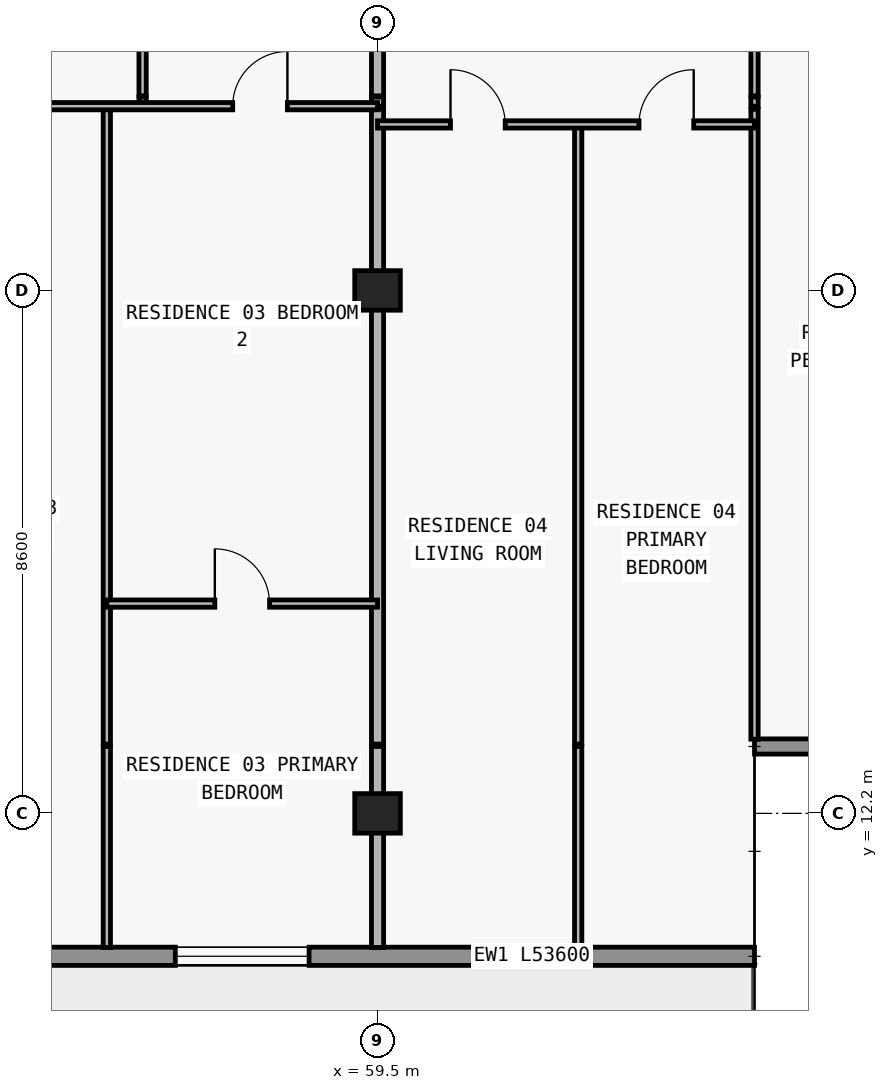
"""IFC4 building model, lengths in metres.
Left out: names, types, materials, properties, quantities, classifications, styles, units other than length and angle.
Written with IfcOpenShell. Run it as: python <this file> out.ifc"""

import sys

from ifc_helpers import new_model, si_unit, direction, frame, frame_2d, origin, origin_2d, place, context, subcontext, project, spatial, rectangle, extrude, element, fill, save


model = new_model("IFC4")
c1 = context("Model", 3, precision=1e-05, world=origin(), true_north=direction((0.0, 1.0)))
c2 = subcontext(c1, "Body", "Model", "MODEL_VIEW")
j1 = project(units=[si_unit("LENGTHUNIT", "METRE"), si_unit("PLANEANGLEUNIT", "RADIAN")], contexts=[c1])
p1 = place(None, origin())
s1 = spatial("IfcSite", under=j1, at=p1, CompositionType="ELEMENT")
p2 = place(p1, origin())
s2 = spatial("IfcBuilding", under=s1, at=p2, CompositionType="ELEMENT")
p3 = place(p2, frame((0.0, 0.0, 259.5)))
s3 = spatial("IfcBuildingStorey", under=s2, at=p3, CompositionType="ELEMENT", Elevation=259.5)
for number, where, z_axis, x_axis in (
    (1, (59.5, 12.2, 0.0), (0.0, 0.0, 1.0), (1.0, 0.0, 0.0)),
    (2, (59.5, 20.8, 0.0), (0.0, 0.0, 1.0), (1.0, 0.0, 0.0)),
):
    element("IfcColumn", number, at=place(p3, frame(where, z_axis=z_axis, x_axis=x_axis)), inside=s3, PredefinedType="COLUMN", context=c2, shape_type="SweptSolid", body=[
        extrude(rectangle(XDim=0.75, YDim=0.65, at=origin_2d()), origin(), (0.0, 0.0, 1.0), 3.05),
    ])
p4 = place(p3, frame((65.7, 9.85, 0.0), z_axis=(0.0, 0.0, 1.0), x_axis=(-1.0, 0.0, 0.0)))
e3 = element("IfcWall", 3, at=p4, inside=s3, PredefinedType="STANDARD", context=c2, shape_type="SweptSolid", body=[
    extrude(rectangle(XDim=53.6, YDim=0.3, at=frame_2d((26.8, 0.0))), origin(), (0.0, 0.0, 1.0), 3.05),
])
p5 = place(p4, frame((49.5, 0.0, 0.0)))
e4 = element("IfcOpeningElement", 4, at=p5, cuts=e3, PredefinedType="OPENING", context=c2, shape_type="SweptSolid", body=[
    extrude(rectangle(XDim=2.0, YDim=2.3, at=frame_2d((1.0, 1.15))), frame((0.0, 0.16, 0.0), z_axis=(0.0, -1.0, 0.0), x_axis=(1.0, 0.0, 0.0)), (0.0, 0.0, 1.0), 0.32),
])
p6 = place(p4, frame((42.1, 0.0, 0.85)))
e5 = element("IfcOpeningElement", 5, at=p6, cuts=e3, PredefinedType="OPENING", context=c2, shape_type="SweptSolid", body=[
    extrude(rectangle(XDim=2.2, YDim=1.55, at=frame_2d((1.1, 0.775))), frame((0.0, 0.16, 0.0), z_axis=(0.0, -1.0, 0.0), x_axis=(1.0, 0.0, 0.0)), (0.0, 0.0, 1.0), 0.32),
])
p7 = place(p4, frame((36.09, 0.0, 0.0)))
e6 = element("IfcOpeningElement", 6, at=p7, cuts=e3, PredefinedType="OPENING", context=c2, shape_type="SweptSolid", body=[
    extrude(rectangle(XDim=2.0, YDim=2.3, at=frame_2d((1.0, 1.15))), frame((0.0, 0.16, 0.0), z_axis=(0.0, -1.0, 0.0), x_axis=(1.0, 0.0, 0.0)), (0.0, 0.0, 1.0), 0.32),
])
p8 = place(p4, frame((31.41, 0.0, 0.65)))
e7 = element("IfcOpeningElement", 7, at=p8, cuts=e3, PredefinedType="OPENING", context=c2, shape_type="SweptSolid", body=[
    extrude(rectangle(XDim=2.6, YDim=1.85, at=frame_2d((1.3, 0.925))), frame((0.0, 0.16, 0.0), z_axis=(0.0, -1.0, 0.0), x_axis=(1.0, 0.0, 0.0)), (0.0, 0.0, 1.0), 0.32),
])
p9 = place(p4, frame((25.7, 0.0, 0.85)))
e8 = element("IfcOpeningElement", 8, at=p9, cuts=e3, PredefinedType="OPENING", context=c2, shape_type="SweptSolid", body=[
    extrude(rectangle(XDim=2.2, YDim=1.55, at=frame_2d((1.1, 0.775))), frame((0.0, 0.16, 0.0), z_axis=(0.0, -1.0, 0.0), x_axis=(1.0, 0.0, 0.0)), (0.0, 0.0, 1.0), 0.32),
])
p10 = place(p4, frame((17.7, 0.0, 0.85)))
e9 = element("IfcOpeningElement", 9, at=p10, cuts=e3, PredefinedType="OPENING", context=c2, shape_type="SweptSolid", body=[
    extrude(rectangle(XDim=2.2, YDim=1.55, at=frame_2d((1.1, 0.775))), frame((0.0, 0.16, 0.0), z_axis=(0.0, -1.0, 0.0), x_axis=(1.0, 0.0, 0.0)), (0.0, 0.0, 1.0), 0.32),
])
p11 = place(p4, frame((11.626, 0.0, 0.0)))
e10 = element("IfcOpeningElement", 10, at=p11, cuts=e3, PredefinedType="OPENING", context=c2, shape_type="SweptSolid", body=[
    extrude(rectangle(XDim=2.0, YDim=2.3, at=frame_2d((1.0, 1.15))), frame((0.0, 0.16, 0.0), z_axis=(0.0, -1.0, 0.0), x_axis=(1.0, 0.0, 0.0)), (0.0, 0.0, 1.0), 0.32),
])
p12 = place(p4, frame((7.326, 0.0, 0.85)))
e11 = element("IfcOpeningElement", 11, at=p12, cuts=e3, PredefinedType="OPENING", context=c2, shape_type="SweptSolid", body=[
    extrude(rectangle(XDim=2.2, YDim=1.55, at=frame_2d((1.1, 0.775))), frame((0.0, 0.16, 0.0), z_axis=(0.0, -1.0, 0.0), x_axis=(1.0, 0.0, 0.0)), (0.0, 0.0, 1.0), 0.32),
])
p13 = place(p3, frame((65.7, 13.3, 0.0), z_axis=(0.0, 0.0, 1.0), x_axis=(1.0, 0.0, 0.0)))
e12 = element("IfcWall", 12, at=p13, inside=s3, PredefinedType="ELEMENTEDWALL", context=c2, shape_type="SweptSolid", body=[
    extrude(rectangle(XDim=3.85, YDim=0.25, at=frame_2d((1.925, 0.0))), origin(), (0.0, 0.0, 1.0), 3.05),
])
p14 = place(p3, frame((55.048, 9.995, 0.0), z_axis=(0.0, 0.0, 1.0), x_axis=(0.0, 1.0, 0.0)))
e13 = element("IfcWall", 13, at=p14, inside=s3, PredefinedType="PARTITIONING", context=c2, shape_type="SweptSolid", body=[
    extrude(rectangle(XDim=3.305, YDim=0.12, at=frame_2d((1.652, 0.0))), origin(), (0.0, 0.0, 1.0), 3.05),
])
p15 = place(p3, frame((55.048, 13.34, 0.0), z_axis=(0.0, 0.0, 1.0), x_axis=(0.0, 1.0, 0.0)))
e14 = element("IfcWall", 14, at=p15, inside=s3, PredefinedType="PARTITIONING", context=c2, shape_type="SweptSolid", body=[
    extrude(rectangle(XDim=10.44, YDim=0.12, at=frame_2d((5.22, 0.0))), origin(), (0.0, 0.0, 1.0), 3.05),
])
p16 = place(p3, frame((55.636, 23.83, 0.0), z_axis=(0.0, 0.0, 1.0), x_axis=(0.0, 1.0, 0.0)))
e15 = element("IfcWall", 15, at=p16, inside=s3, PredefinedType="PARTITIONING", context=c2, shape_type="SweptSolid", body=[
    extrude(rectangle(XDim=0.15, YDim=0.12, at=frame_2d((0.075, 0.0))), origin(), (0.0, 0.0, 1.0), 3.05),
])
p17 = place(p3, frame((55.636, 24.0, 0.0), z_axis=(0.0, 0.0, 1.0), x_axis=(0.0, 1.0, 0.0)))
e16 = element("IfcWall", 16, at=p17, inside=s3, PredefinedType="PARTITIONING", context=c2, shape_type="SweptSolid", body=[
    extrude(rectangle(XDim=4.58, YDim=0.12, at=frame_2d((2.29, 0.0))), origin(), (0.0, 0.0, 1.0), 3.05),
])
p18 = place(p17, frame((1.84, 0.0, 0.0)))
e17 = element("IfcOpeningElement", 17, at=p18, cuts=e16, PredefinedType="OPENING", context=c2, shape_type="SweptSolid", body=[
    extrude(rectangle(XDim=0.9, YDim=2.15, at=frame_2d((0.45, 1.075))), frame((0.0, 0.07, 0.0), z_axis=(0.0, -1.0, 0.0), x_axis=(1.0, 0.0, 0.0)), (0.0, 0.0, 1.0), 0.14),
])
p19 = place(p3, frame((59.5, 9.995, 0.0), z_axis=(0.0, 0.0, 1.0), x_axis=(0.0, 1.0, 0.0)))
e18 = element("IfcWall", 18, at=p19, inside=s3, PredefinedType="PARTITIONING", context=c2, shape_type="SweptSolid", body=[
    extrude(rectangle(XDim=3.305, YDim=0.2, at=frame_2d((1.652, 0.0))), origin(), (0.0, 0.0, 1.0), 2.263),
])
p20 = place(p3, frame((59.5, 13.34, 0.0), z_axis=(0.0, 0.0, 1.0), x_axis=(0.0, 1.0, 0.0)))
e19 = element("IfcWall", 19, at=p20, inside=s3, PredefinedType="PARTITIONING", context=c2, shape_type="SweptSolid", body=[
    extrude(rectangle(XDim=10.44, YDim=0.2, at=frame_2d((5.22, 0.0))), origin(), (0.0, 0.0, 1.0), 2.263),
])
p21 = place(p3, frame((59.5, 23.83, 0.0), z_axis=(0.0, 0.0, 1.0), x_axis=(0.0, 1.0, 0.0)))
e20 = element("IfcWall", 20, at=p21, inside=s3, PredefinedType="PARTITIONING", context=c2, shape_type="SweptSolid", body=[
    extrude(rectangle(XDim=0.15, YDim=0.2, at=frame_2d((0.075, 0.0))), origin(), (0.0, 0.0, 1.0), 2.263),
])
p22 = place(p3, frame((59.5, 24.0, 0.0), z_axis=(0.0, 0.0, 1.0), x_axis=(0.0, 1.0, 0.0)))
e21 = element("IfcWall", 21, at=p22, inside=s3, PredefinedType="PARTITIONING", context=c2, shape_type="SweptSolid", body=[
    extrude(rectangle(XDim=4.58, YDim=0.2, at=frame_2d((2.29, 0.0))), origin(), (0.0, 0.0, 1.0), 2.263),
])
p23 = place(p3, frame((62.8, 9.995, 0.0), z_axis=(0.0, 0.0, 1.0), x_axis=(0.0, 1.0, 0.0)))
e22 = element("IfcWall", 22, at=p23, inside=s3, PredefinedType="PARTITIONING", context=c2, shape_type="SweptSolid", body=[
    extrude(rectangle(XDim=3.305, YDim=0.12, at=frame_2d((1.652, 0.0))), origin(), (0.0, 0.0, 1.0), 3.05),
])
p24 = place(p3, frame((62.8, 13.34, 0.0), z_axis=(0.0, 0.0, 1.0), x_axis=(0.0, 1.0, 0.0)))
e23 = element("IfcWall", 23, at=p24, inside=s3, PredefinedType="PARTITIONING", context=c2, shape_type="SweptSolid", body=[
    extrude(rectangle(XDim=10.19, YDim=0.12, at=frame_2d((5.095, 0.0))), origin(), (0.0, 0.0, 1.0), 3.05),
])
p25 = place(p3, frame((65.7, 13.42, 0.0), z_axis=(0.0, 0.0, 1.0), x_axis=(0.0, 1.0, 0.0)))
e24 = element("IfcWall", 24, at=p25, inside=s3, PredefinedType="PARTITIONING", context=c2, shape_type="SweptSolid", body=[
    extrude(rectangle(XDim=10.36, YDim=0.12, at=frame_2d((5.18, 0.0))), origin(), (0.0, 0.0, 1.0), 2.629),
])
p26 = place(p3, frame((65.7, 23.83, 0.0), z_axis=(0.0, 0.0, 1.0), x_axis=(0.0, 1.0, 0.0)))
e25 = element("IfcWall", 25, at=p26, inside=s3, PredefinedType="PARTITIONING", context=c2, shape_type="SweptSolid", body=[
    extrude(rectangle(XDim=0.15, YDim=0.12, at=frame_2d((0.075, 0.0))), origin(), (0.0, 0.0, 1.0), 2.629),
])
p27 = place(p3, frame((65.7, 24.0, 0.0), z_axis=(0.0, 0.0, 1.0), x_axis=(0.0, 1.0, 0.0)))
e26 = element("IfcWall", 26, at=p27, inside=s3, PredefinedType="PARTITIONING", context=c2, shape_type="SweptSolid", body=[
    extrude(rectangle(XDim=4.58, YDim=0.12, at=frame_2d((2.29, 0.0))), origin(), (0.0, 0.0, 1.0), 2.629),
])
p28 = place(p27, frame((1.84, 0.0, 0.0)))
e27 = element("IfcOpeningElement", 27, at=p28, cuts=e26, PredefinedType="OPENING", context=c2, shape_type="SweptSolid", body=[
    extrude(rectangle(XDim=0.9, YDim=2.15, at=frame_2d((0.45, 1.075))), frame((0.0, 0.07, 0.0), z_axis=(0.0, -1.0, 0.0), x_axis=(1.0, 0.0, 0.0)), (0.0, 0.0, 1.0), 0.14),
])
p29 = place(p3, frame((55.048, 15.65, 0.0), z_axis=(0.0, 0.0, 1.0), x_axis=(1.0, 0.0, 0.0)))
e28 = element("IfcWall", 28, at=p29, inside=s3, PredefinedType="PARTITIONING", context=c2, shape_type="SweptSolid", body=[
    extrude(rectangle(XDim=4.452, YDim=0.12, at=frame_2d((2.226, 0.0))), origin(), (0.0, 0.0, 1.0), 3.05),
])
p30 = place(p29, frame((1.776, 0.0, 0.0)))
e29 = element("IfcOpeningElement", 29, at=p30, cuts=e28, PredefinedType="OPENING", context=c2, shape_type="SweptSolid", body=[
    extrude(rectangle(XDim=0.9, YDim=2.15, at=frame_2d((0.45, 1.075))), frame((0.0, 0.07, 0.0), z_axis=(0.0, -1.0, 0.0), x_axis=(1.0, 0.0, 0.0)), (0.0, 0.0, 1.0), 0.14),
])
p31 = place(p3, frame((59.5, 23.53, 0.0), z_axis=(0.0, 0.0, 1.0), x_axis=(1.0, 0.0, 0.0)))
e30 = element("IfcWall", 30, at=p31, inside=s3, PredefinedType="PARTITIONING", context=c2, shape_type="SweptSolid", body=[
    extrude(rectangle(XDim=6.2, YDim=0.12, at=frame_2d((3.1, 0.0))), origin(), (0.0, 0.0, 1.0), 3.05),
])
p32 = place(p31, frame((1.2, 0.0, 0.0)))
e31 = element("IfcOpeningElement", 31, at=p32, cuts=e30, PredefinedType="OPENING", context=c2, shape_type="SweptSolid", body=[
    extrude(rectangle(XDim=0.9, YDim=2.15, at=frame_2d((0.45, 1.075))), frame((0.0, 0.07, 0.0), z_axis=(0.0, -1.0, 0.0), x_axis=(1.0, 0.0, 0.0)), (0.0, 0.0, 1.0), 0.14),
])
p33 = place(p31, frame((4.3, 0.0, 0.0)))
e32 = element("IfcOpeningElement", 32, at=p33, cuts=e30, PredefinedType="OPENING", context=c2, shape_type="SweptSolid", body=[
    extrude(rectangle(XDim=0.9, YDim=2.15, at=frame_2d((0.45, 1.075))), frame((0.0, 0.07, 0.0), z_axis=(0.0, -1.0, 0.0), x_axis=(1.0, 0.0, 0.0)), (0.0, 0.0, 1.0), 0.14),
])
p34 = place(p3, frame((51.32, 23.83, 0.0), z_axis=(0.0, 0.0, 1.0), x_axis=(1.0, 0.0, 0.0)))
e33 = element("IfcWall", 33, at=p34, inside=s3, PredefinedType="PARTITIONING", context=c2, shape_type="SweptSolid", body=[
    extrude(rectangle(XDim=8.18, YDim=0.12, at=frame_2d((4.09, 0.0))), origin(), (0.0, 0.0, 1.0), 3.05),
])
p35 = place(p34, frame((1.414, 0.0, 0.0)))
e34 = element("IfcOpeningElement", 34, at=p35, cuts=e33, PredefinedType="OPENING", context=c2, shape_type="SweptSolid", body=[
    extrude(rectangle(XDim=0.9, YDim=2.15, at=frame_2d((0.45, 1.075))), frame((0.0, 0.07, 0.0), z_axis=(0.0, -1.0, 0.0), x_axis=(1.0, 0.0, 0.0)), (0.0, 0.0, 1.0), 0.14),
])
p36 = place(p34, frame((5.798, 0.0, 0.0)))
e35 = element("IfcOpeningElement", 35, at=p36, cuts=e33, PredefinedType="OPENING", context=c2, shape_type="SweptSolid", body=[
    extrude(rectangle(XDim=0.9, YDim=2.15, at=frame_2d((0.45, 1.075))), frame((0.0, 0.07, 0.0), z_axis=(0.0, -1.0, 0.0), x_axis=(1.0, 0.0, 0.0)), (0.0, 0.0, 1.0), 0.14),
])
p37 = place(p12, origin())
e36 = element("IfcWindow", 36, at=p37, inside=s3, PartitioningType="SINGLE_PANEL", PredefinedType="WINDOW", context=c2, shape_type="SweptSolid", body=[
    extrude(rectangle(XDim=2.2, YDim=1.55, at=frame_2d((1.1, 0.775))), frame((0.0, 0.03, 0.0), z_axis=(0.0, -1.0, 0.0), x_axis=(1.0, 0.0, 0.0)), (0.0, 0.0, 1.0), 0.06),
])
fill(e11, e36)
p38 = place(p36, origin())
e37 = element("IfcDoor", 37, at=p38, inside=s3, OperationType="SINGLE_SWING_RIGHT", PredefinedType="DOOR", context=c2, shape_type="SweptSolid", body=[
    extrude(rectangle(XDim=0.9, YDim=2.15, at=frame_2d((0.45, 1.075))), frame((0.0, 0.025, 0.0), z_axis=(0.0, -1.0, 0.0), x_axis=(1.0, 0.0, 0.0)), (0.0, 0.0, 1.0), 0.05),
])
fill(e35, e37)
p39 = place(p30, origin())
e38 = element("IfcDoor", 38, at=p39, inside=s3, OperationType="SINGLE_SWING_LEFT", PredefinedType="DOOR", context=c2, shape_type="SweptSolid", body=[
    extrude(rectangle(XDim=0.9, YDim=2.15, at=frame_2d((0.45, 1.075))), frame((0.0, 0.025, 0.0), z_axis=(0.0, -1.0, 0.0), x_axis=(1.0, 0.0, 0.0)), (0.0, 0.0, 1.0), 0.05),
])
fill(e29, e38)
p40 = place(p32, origin())
e39 = element("IfcDoor", 39, at=p40, inside=s3, OperationType="SINGLE_SWING_LEFT", PredefinedType="DOOR", context=c2, shape_type="SweptSolid", body=[
    extrude(rectangle(XDim=0.9, YDim=2.15, at=frame_2d((0.45, 1.075))), frame((0.0, 0.025, 0.0), z_axis=(0.0, -1.0, 0.0), x_axis=(1.0, 0.0, 0.0)), (0.0, 0.0, 1.0), 0.05),
])
fill(e31, e39)
p41 = place(p33, origin())
e40 = element("IfcDoor", 40, at=p41, inside=s3, OperationType="SINGLE_SWING_RIGHT", PredefinedType="DOOR", context=c2, shape_type="SweptSolid", body=[
    extrude(rectangle(XDim=0.9, YDim=2.15, at=frame_2d((0.45, 1.075))), frame((0.0, 0.025, 0.0), z_axis=(0.0, -1.0, 0.0), x_axis=(1.0, 0.0, 0.0)), (0.0, 0.0, 1.0), 0.05),
])
fill(e32, e40)
save(model, sys.argv[1])
